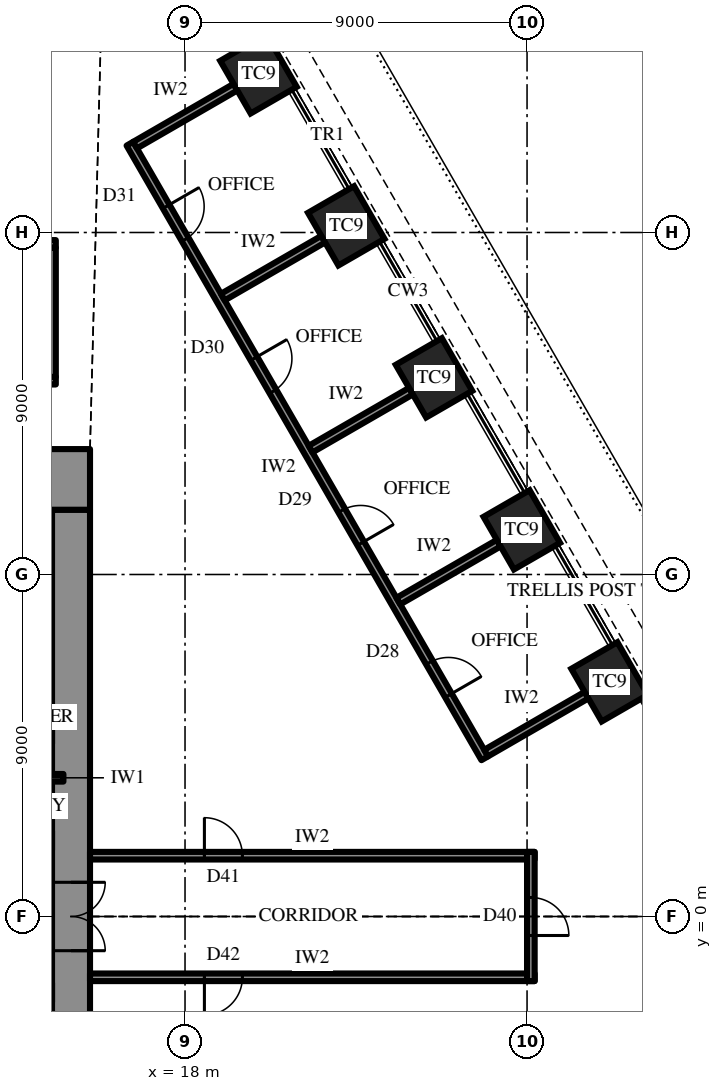
"""IFC4 building model, lengths in metres.
Left out: names, types, materials, properties, quantities, classifications, styles, units other than length and angle.
Written with IfcOpenShell. Run it as: python <this file> out.ifc"""

import sys

from ifc_helpers import new_model, si_unit, direction, frame, frame_2d, origin, origin_2d, place, context, subcontext, project, spatial, rectangle, extrude, element, fill, save


model = new_model("IFC4")
c1 = context("Model", 3, precision=1e-05, world=origin(), true_north=direction((0.0, 1.0)))
c2 = subcontext(c1, "Body", "Model", "MODEL_VIEW")
j1 = project(units=[si_unit("LENGTHUNIT", "METRE"), si_unit("PLANEANGLEUNIT", "RADIAN")], contexts=[c1])
p1 = place(None, origin())
s1 = spatial("IfcSite", under=j1, at=p1, CompositionType="ELEMENT")
p2 = place(p1, origin())
s2 = spatial("IfcBuilding", under=s1, at=p2, CompositionType="ELEMENT")
p3 = place(p2, frame((0.0, 0.0, 232.3)))
s3 = spatial("IfcBuildingStorey", under=s2, at=p3, CompositionType="ELEMENT", Elevation=232.3)
for number, where, z_axis, x_axis in (
    (1, (29.171, 6.175, 0.0), (0.0, 0.0, 1.0), (-0.5, 0.866, 0.0)),
    (2, (26.861, 10.175, 0.0), (0.0, 0.0, 1.0), (-0.5, 0.866, 0.0)),
    (3, (24.552, 14.175, 0.0), (0.0, 0.0, 1.0), (-0.5, 0.866, 0.0)),
    (4, (22.242, 18.175, 0.0), (0.0, 0.0, 1.0), (-0.5, 0.866, 0.0)),
    (5, (19.933, 22.175, 0.0), (0.0, 0.0, 1.0), (-0.5, 0.866, 0.0)),
):
    element("IfcColumn", number, at=place(p3, frame(where, z_axis=z_axis, x_axis=x_axis)), inside=s3, PredefinedType="COLUMN", context=c2, shape_type="SweptSolid", body=[
        extrude(rectangle(XDim=1.6, YDim=1.4, at=origin_2d()), origin(), (0.0, 0.0, 1.0), 4.2),
    ])
p4 = place(p3, frame((-15.5, 11.5, 0.0), z_axis=(0.0, 0.0, 1.0), x_axis=(1.0, 0.0, 0.0)))
e6 = element("IfcWall", 6, at=p4, inside=s3, PredefinedType="SHEAR", context=c2, shape_type="SweptSolid", body=[
    extrude(rectangle(XDim=31.0, YDim=1.6, at=frame_2d((15.5, 0.0))), origin(), (0.0, 0.0, 1.0), 4.2),
])
p5 = place(p4, frame((16.35, 0.0, 0.0)))
e7 = element("IfcOpeningElement", 7, at=p5, cuts=e6, PredefinedType="OPENING", context=c2, shape_type="SweptSolid", body=[
    extrude(rectangle(XDim=0.9, YDim=2.2, at=frame_2d((0.45, 1.1))), frame((0.0, 0.81, 0.0), z_axis=(0.0, -1.0, 0.0), x_axis=(1.0, 0.0, 0.0)), (0.0, 0.0, 1.0), 1.62),
])
p6 = place(p4, frame((19.35, 0.0, 0.0)))
e8 = element("IfcOpeningElement", 8, at=p6, cuts=e6, PredefinedType="OPENING", context=c2, shape_type="SweptSolid", body=[
    extrude(rectangle(XDim=0.9, YDim=2.2, at=frame_2d((0.45, 1.1))), frame((0.0, 0.81, 0.0), z_axis=(0.0, -1.0, 0.0), x_axis=(1.0, 0.0, 0.0)), (0.0, 0.0, 1.0), 1.62),
])
p7 = place(p4, frame((22.4, 0.0, 0.0)))
e9 = element("IfcOpeningElement", 9, at=p7, cuts=e6, PredefinedType="OPENING", context=c2, shape_type="SweptSolid", body=[
    extrude(rectangle(XDim=1.0, YDim=2.2, at=frame_2d((0.5, 1.1))), frame((0.0, 0.81, 0.0), z_axis=(0.0, -1.0, 0.0), x_axis=(1.0, 0.0, 0.0)), (0.0, 0.0, 1.0), 1.62),
])
p8 = place(p4, frame((1.65, 0.0, 0.0)))
e10 = element("IfcOpeningElement", 10, at=p8, cuts=e6, PredefinedType="OPENING", context=c2, shape_type="SweptSolid", body=[
    extrude(rectangle(XDim=0.9, YDim=2.2, at=frame_2d((0.45, 1.1))), frame((0.0, 0.81, 0.0), z_axis=(0.0, -1.0, 0.0), x_axis=(1.0, 0.0, 0.0)), (0.0, 0.0, 1.0), 1.62),
])
p9 = place(p4, frame((4.65, 0.0, 0.0)))
e11 = element("IfcOpeningElement", 11, at=p9, cuts=e6, PredefinedType="OPENING", context=c2, shape_type="SweptSolid", body=[
    extrude(rectangle(XDim=0.9, YDim=2.2, at=frame_2d((0.45, 1.1))), frame((0.0, 0.81, 0.0), z_axis=(0.0, -1.0, 0.0), x_axis=(1.0, 0.0, 0.0)), (0.0, 0.0, 1.0), 1.62),
])
p10 = place(p4, frame((25.45, 0.0, 0.0)))
e12 = element("IfcOpeningElement", 12, at=p10, cuts=e6, PredefinedType="OPENING", context=c2, shape_type="SweptSolid", body=[
    extrude(rectangle(XDim=0.9, YDim=2.2, at=frame_2d((0.45, 1.1))), frame((0.0, 0.81, 0.0), z_axis=(0.0, -1.0, 0.0), x_axis=(1.0, 0.0, 0.0)), (0.0, 0.0, 1.0), 1.62),
])
p11 = place(p4, frame((28.45, 0.0, 0.0)))
e13 = element("IfcOpeningElement", 13, at=p11, cuts=e6, PredefinedType="OPENING", context=c2, shape_type="SweptSolid", body=[
    extrude(rectangle(XDim=0.9, YDim=2.2, at=frame_2d((0.45, 1.1))), frame((0.0, 0.81, 0.0), z_axis=(0.0, -1.0, 0.0), x_axis=(1.0, 0.0, 0.0)), (0.0, 0.0, 1.0), 1.62),
])
p12 = place(p3, frame((15.0, -10.7, 0.0), z_axis=(0.0, 0.0, 1.0), x_axis=(0.0, 1.0, 0.0)))
e14 = element("IfcWall", 14, at=p12, inside=s3, PredefinedType="SHEAR", context=c2, shape_type="SweptSolid", body=[
    extrude(rectangle(XDim=21.4, YDim=1.0, at=frame_2d((10.7, 0.0))), origin(), (0.0, 0.0, 1.0), 4.2),
])
p13 = place(p12, frame((9.8, 0.0, 0.0)))
e15 = element("IfcOpeningElement", 15, at=p13, cuts=e14, PredefinedType="OPENING", context=c2, shape_type="SweptSolid", body=[
    extrude(rectangle(XDim=1.8, YDim=2.4, at=frame_2d((0.9, 1.2))), frame((0.0, 0.51, 0.0), z_axis=(0.0, -1.0, 0.0), x_axis=(1.0, 0.0, 0.0)), (0.0, 0.0, 1.0), 1.02),
])
p14 = place(p3, frame((12.3, 2.0, 0.0), z_axis=(0.0, 0.0, 1.0), x_axis=(1.0, 0.0, 0.0)))
e16 = element("IfcWall", 16, at=p14, inside=s3, PredefinedType="SHEAR", context=c2, shape_type="SweptSolid", body=[
    extrude(rectangle(XDim=2.2, YDim=0.5, at=frame_2d((1.1, 0.0))), origin(), (0.0, 0.0, 1.0), 4.2),
])
p15 = place(p14, frame((0.8, 0.0, 0.0)))
e17 = element("IfcOpeningElement", 17, at=p15, cuts=e16, PredefinedType="OPENING", context=c2, shape_type="SweptSolid", body=[
    extrude(rectangle(XDim=0.9, YDim=2.2, at=frame_2d((0.45, 1.1))), frame((0.0, 0.26, 0.0), z_axis=(0.0, -1.0, 0.0), x_axis=(1.0, 0.0, 0.0)), (0.0, 0.0, 1.0), 0.52),
])
p16 = place(p3, frame((12.3, 4.8, 0.0), z_axis=(0.0, 0.0, 1.0), x_axis=(1.0, 0.0, 0.0)))
e18 = element("IfcWall", 18, at=p16, inside=s3, PredefinedType="SHEAR", context=c2, shape_type="SweptSolid", body=[
    extrude(rectangle(XDim=2.2, YDim=0.5, at=frame_2d((1.1, 0.0))), origin(), (0.0, 0.0, 1.0), 4.2),
])
p17 = place(p3, frame((13.8, 3.65, 0.0), z_axis=(0.0, 0.0, 1.0), x_axis=(1.0, 0.0, 0.0)))
e19 = element("IfcWall", 19, at=p17, inside=s3, PredefinedType="PARTITIONING", context=c2, shape_type="SweptSolid", body=[
    extrude(rectangle(XDim=1.0, YDim=0.2, at=frame_2d((0.5, 0.0))), origin(), (0.0, 0.0, 1.0), 4.0),
])
p18 = place(p3, frame((-14.6, 14.1, 0.0), z_axis=(0.0, 0.0, 1.0), x_axis=(1.0, 0.0, 0.0)))
e20 = element("IfcWall", 20, at=p18, inside=s3, PredefinedType="PARTITIONING", context=c2, shape_type="SweptSolid", body=[
    extrude(rectangle(XDim=29.2, YDim=0.2, at=frame_2d((14.6, 0.0))), origin(), (0.0, 0.0, 1.0), 4.0),
])
p19 = place(p3, frame((-14.6, 17.7, 0.0), z_axis=(0.0, 0.0, 1.0), x_axis=(1.0, 0.0, 0.0)))
e21 = element("IfcWall", 21, at=p19, inside=s3, PredefinedType="PARTITIONING", context=c2, shape_type="SweptSolid", body=[
    extrude(rectangle(XDim=29.2, YDim=0.2, at=frame_2d((14.6, 0.0))), origin(), (0.0, 0.0, 1.0), 4.0),
])
p20 = place(p19, frame((6.45, 0.0, 0.0)))
e22 = element("IfcOpeningElement", 22, at=p20, cuts=e21, PredefinedType="OPENING", context=c2, shape_type="SweptSolid", body=[
    extrude(rectangle(XDim=1.8, YDim=2.4, at=frame_2d((0.9, 1.2))), frame((0.0, 0.11, 0.0), z_axis=(0.0, -1.0, 0.0), x_axis=(1.0, 0.0, 0.0)), (0.0, 0.0, 1.0), 0.22),
])
p21 = place(p19, frame((20.95, 0.0, 0.0)))
e23 = element("IfcOpeningElement", 23, at=p21, cuts=e21, PredefinedType="OPENING", context=c2, shape_type="SweptSolid", body=[
    extrude(rectangle(XDim=1.8, YDim=2.4, at=frame_2d((0.9, 1.2))), frame((0.0, 0.11, 0.0), z_axis=(0.0, -1.0, 0.0), x_axis=(1.0, 0.0, 0.0)), (0.0, 0.0, 1.0), 0.22),
])
p22 = place(p3, frame((14.5, 14.2, 0.0), z_axis=(0.0, 0.0, 1.0), x_axis=(0.0, 1.0, 0.0)))
e24 = element("IfcWall", 24, at=p22, inside=s3, PredefinedType="PARTITIONING", context=c2, shape_type="SweptSolid", body=[
    extrude(rectangle(XDim=3.4, YDim=0.2, at=frame_2d((1.7, 0.0))), origin(), (0.0, 0.0, 1.0), 4.0),
])
p23 = place(p3, frame((25.886, 4.163, 0.0), z_axis=(0.0, 0.0, 1.0), x_axis=(-0.499998569178, 0.866026229868, 0.0)))
e25 = element("IfcWall", 25, at=p23, inside=s3, PredefinedType="PARTITIONING", context=c2, shape_type="SweptSolid", body=[
    extrude(rectangle(XDim=18.675, YDim=0.2, at=frame_2d((9.338, 0.0))), origin(), (0.0, 0.0, 1.0), 4.0),
])
p24 = place(p23, frame((1.909, 0.0, 0.0)))
e26 = element("IfcOpeningElement", 26, at=p24, cuts=e25, PredefinedType="OPENING", context=c2, shape_type="SweptSolid", body=[
    extrude(rectangle(XDim=1.0, YDim=2.2, at=frame_2d((0.5, 1.1))), frame((0.0, 0.11, 0.0), z_axis=(0.0, -1.0, 0.0), x_axis=(1.0, 0.0, 0.0)), (0.0, 0.0, 1.0), 0.22),
])
p25 = place(p23, frame((6.528, 0.0, 0.0)))
e27 = element("IfcOpeningElement", 27, at=p25, cuts=e25, PredefinedType="OPENING", context=c2, shape_type="SweptSolid", body=[
    extrude(rectangle(XDim=1.0, YDim=2.2, at=frame_2d((0.5, 1.1))), frame((0.0, 0.11, 0.0), z_axis=(0.0, -1.0, 0.0), x_axis=(1.0, 0.0, 0.0)), (0.0, 0.0, 1.0), 0.22),
])
p26 = place(p23, frame((11.147, 0.0, 0.0)))
e28 = element("IfcOpeningElement", 28, at=p26, cuts=e25, PredefinedType="OPENING", context=c2, shape_type="SweptSolid", body=[
    extrude(rectangle(XDim=1.0, YDim=2.2, at=frame_2d((0.5, 1.1))), frame((0.0, 0.11, 0.0), z_axis=(0.0, -1.0, 0.0), x_axis=(1.0, 0.0, 0.0)), (0.0, 0.0, 1.0), 0.22),
])
p27 = place(p23, frame((15.766, 0.0, 0.0)))
e29 = element("IfcOpeningElement", 29, at=p27, cuts=e25, PredefinedType="OPENING", context=c2, shape_type="SweptSolid", body=[
    extrude(rectangle(XDim=1.0, YDim=2.2, at=frame_2d((0.5, 1.1))), frame((0.0, 0.11, 0.0), z_axis=(0.0, -1.0, 0.0), x_axis=(1.0, 0.0, 0.0)), (0.0, 0.0, 1.0), 0.22),
])
for number, where, z_axis, x_axis in (
    (30, (25.923, 4.3, 0.0), (0.0, 0.0, 1.0), (0.866, 0.5, 0.0)),
    (31, (23.614, 8.3, 0.0), (0.0, 0.0, 1.0), (0.866, 0.5, 0.0)),
    (32, (21.304, 12.3, 0.0), (0.0, 0.0, 1.0), (0.866, 0.5, 0.0)),
    (33, (18.995, 16.3, 0.0), (0.0, 0.0, 1.0), (0.866, 0.5, 0.0)),
    (34, (16.685, 20.3, 0.0), (0.0, 0.0, 1.0), (0.866, 0.5, 0.0)),
):
    element("IfcWall", number, at=place(p3, frame(where, z_axis=z_axis, x_axis=x_axis)), inside=s3, PredefinedType="PARTITIONING", context=c2, shape_type="SweptSolid", body=[
        extrude(rectangle(XDim=3.05, YDim=0.2, at=frame_2d((1.525, 0.0))), origin(), (0.0, 0.0, 1.0), 3.082),
    ])
p28 = place(p3, frame((15.5, 1.6, 0.0), z_axis=(0.0, 0.0, 1.0), x_axis=(1.0, 0.0, 0.0)))
e35 = element("IfcWall", 35, at=p28, inside=s3, PredefinedType="PARTITIONING", context=c2, shape_type="SweptSolid", body=[
    extrude(rectangle(XDim=11.7, YDim=0.2, at=frame_2d((5.85, 0.0))), origin(), (0.0, 0.0, 1.0), 4.0),
])
p29 = place(p28, frame((3.01, 0.0, 0.0)))
e36 = element("IfcOpeningElement", 36, at=p29, cuts=e35, PredefinedType="OPENING", context=c2, shape_type="SweptSolid", body=[
    extrude(rectangle(XDim=1.0, YDim=2.2, at=frame_2d((0.5, 1.1))), frame((0.0, 0.11, 0.0), z_axis=(0.0, -1.0, 0.0), x_axis=(1.0, 0.0, 0.0)), (0.0, 0.0, 1.0), 0.22),
])
p30 = place(p3, frame((15.5, -1.6, 0.0), z_axis=(0.0, 0.0, 1.0), x_axis=(1.0, 0.0, 0.0)))
e37 = element("IfcWall", 37, at=p30, inside=s3, PredefinedType="PARTITIONING", context=c2, shape_type="SweptSolid", body=[
    extrude(rectangle(XDim=11.7, YDim=0.2, at=frame_2d((5.85, 0.0))), origin(), (0.0, 0.0, 1.0), 4.0),
])
p31 = place(p30, frame((3.01, 0.0, 0.0)))
e38 = element("IfcOpeningElement", 38, at=p31, cuts=e37, PredefinedType="OPENING", context=c2, shape_type="SweptSolid", body=[
    extrude(rectangle(XDim=1.0, YDim=2.2, at=frame_2d((0.5, 1.1))), frame((0.0, 0.11, 0.0), z_axis=(0.0, -1.0, 0.0), x_axis=(1.0, 0.0, 0.0)), (0.0, 0.0, 1.0), 0.22),
])
p32 = place(p3, frame((27.1, -1.7, 0.0), z_axis=(0.0, 0.0, 1.0), x_axis=(0.0, 1.0, 0.0)))
e39 = element("IfcWall", 39, at=p32, inside=s3, PredefinedType="PARTITIONING", context=c2, shape_type="SweptSolid", body=[
    extrude(rectangle(XDim=3.4, YDim=0.2, at=frame_2d((1.7, 0.0))), origin(), (0.0, 0.0, 1.0), 4.0),
])
p33 = place(p32, frame((1.2, 0.0, 0.0)))
e40 = element("IfcOpeningElement", 40, at=p33, cuts=e39, PredefinedType="OPENING", context=c2, shape_type="SweptSolid", body=[
    extrude(rectangle(XDim=1.0, YDim=2.2, at=frame_2d((0.5, 1.1))), frame((0.0, 0.11, 0.0), z_axis=(0.0, -1.0, 0.0), x_axis=(1.0, 0.0, 0.0)), (0.0, 0.0, 1.0), 0.22),
])
p34 = place(p13, frame((1.8, 0.0, 0.0), z_axis=(0.0, 0.0, 1.0), x_axis=(-1.0, 0.0, 0.0)))
e41 = element("IfcDoor", 41, at=p34, inside=s3, OperationType="DOUBLE_DOOR_SINGLE_SWING", PredefinedType="DOOR", context=c2, shape_type="SweptSolid", body=[
    extrude(rectangle(XDim=1.8, YDim=2.4, at=frame_2d((0.9, 1.2))), frame((0.0, 0.025, 0.0), z_axis=(0.0, -1.0, 0.0), x_axis=(1.0, 0.0, 0.0)), (0.0, 0.0, 1.0), 0.05),
])
fill(e15, e41)
p35 = place(p24, frame((1.0, 0.0, 0.0), z_axis=(0.0, 0.0, 1.0), x_axis=(-1.0, 0.0, 0.0)))
e42 = element("IfcDoor", 42, at=p35, inside=s3, OperationType="SINGLE_SWING_LEFT", PredefinedType="DOOR", context=c2, shape_type="SweptSolid", body=[
    extrude(rectangle(XDim=1.0, YDim=2.2, at=frame_2d((0.5, 1.1))), frame((0.0, 0.025, 0.0), z_axis=(0.0, -1.0, 0.0), x_axis=(1.0, 0.0, 0.0)), (0.0, 0.0, 1.0), 0.05),
])
fill(e26, e42)
p36 = place(p25, frame((1.0, 0.0, 0.0), z_axis=(0.0, 0.0, 1.0), x_axis=(-1.0, 0.0, 0.0)))
e43 = element("IfcDoor", 43, at=p36, inside=s3, OperationType="SINGLE_SWING_LEFT", PredefinedType="DOOR", context=c2, shape_type="SweptSolid", body=[
    extrude(rectangle(XDim=1.0, YDim=2.2, at=frame_2d((0.5, 1.1))), frame((0.0, 0.025, 0.0), z_axis=(0.0, -1.0, 0.0), x_axis=(1.0, 0.0, 0.0)), (0.0, 0.0, 1.0), 0.05),
])
fill(e27, e43)
p37 = place(p26, frame((1.0, 0.0, 0.0), z_axis=(0.0, 0.0, 1.0), x_axis=(-1.0, 0.0, 0.0)))
e44 = element("IfcDoor", 44, at=p37, inside=s3, OperationType="SINGLE_SWING_RIGHT", PredefinedType="DOOR", context=c2, shape_type="SweptSolid", body=[
    extrude(rectangle(XDim=1.0, YDim=2.2, at=frame_2d((0.5, 1.1))), frame((0.0, 0.025, 0.0), z_axis=(0.0, -1.0, 0.0), x_axis=(1.0, 0.0, 0.0)), (0.0, 0.0, 1.0), 0.05),
])
fill(e28, e44)
p38 = place(p27, frame((1.0, 0.0, 0.0), z_axis=(0.0, 0.0, 1.0), x_axis=(-1.0, 0.0, 0.0)))
e45 = element("IfcDoor", 45, at=p38, inside=s3, OperationType="SINGLE_SWING_RIGHT", PredefinedType="DOOR", context=c2, shape_type="SweptSolid", body=[
    extrude(rectangle(XDim=1.0, YDim=2.2, at=frame_2d((0.5, 1.1))), frame((0.0, 0.025, 0.0), z_axis=(0.0, -1.0, 0.0), x_axis=(1.0, 0.0, 0.0)), (0.0, 0.0, 1.0), 0.05),
])
fill(e29, e45)
p39 = place(p29, origin())
e46 = element("IfcDoor", 46, at=p39, inside=s3, OperationType="SINGLE_SWING_RIGHT", PredefinedType="DOOR", context=c2, shape_type="SweptSolid", body=[
    extrude(rectangle(XDim=1.0, YDim=2.2, at=frame_2d((0.5, 1.1))), frame((0.0, 0.025, 0.0), z_axis=(0.0, -1.0, 0.0), x_axis=(1.0, 0.0, 0.0)), (0.0, 0.0, 1.0), 0.05),
])
fill(e36, e46)
p40 = place(p31, frame((1.0, 0.0, 0.0), z_axis=(0.0, 0.0, 1.0), x_axis=(-1.0, 0.0, 0.0)))
e47 = element("IfcDoor", 47, at=p40, inside=s3, OperationType="SINGLE_SWING_LEFT", PredefinedType="DOOR", context=c2, shape_type="SweptSolid", body=[
    extrude(rectangle(XDim=1.0, YDim=2.2, at=frame_2d((0.5, 1.1))), frame((0.0, 0.025, 0.0), z_axis=(0.0, -1.0, 0.0), x_axis=(1.0, 0.0, 0.0)), (0.0, 0.0, 1.0), 0.05),
])
fill(e38, e47)
p41 = place(p33, frame((1.0, 0.0, 0.0), z_axis=(0.0, 0.0, 1.0), x_axis=(-1.0, 0.0, 0.0)))
e48 = element("IfcDoor", 48, at=p41, inside=s3, OperationType="SINGLE_SWING_LEFT", PredefinedType="DOOR", context=c2, shape_type="SweptSolid", body=[
    extrude(rectangle(XDim=1.0, YDim=2.2, at=frame_2d((0.5, 1.1))), frame((0.0, 0.025, 0.0), z_axis=(0.0, -1.0, 0.0), x_axis=(1.0, 0.0, 0.0)), (0.0, 0.0, 1.0), 0.05),
])
fill(e40, e48)
save(model, sys.argv[1])
